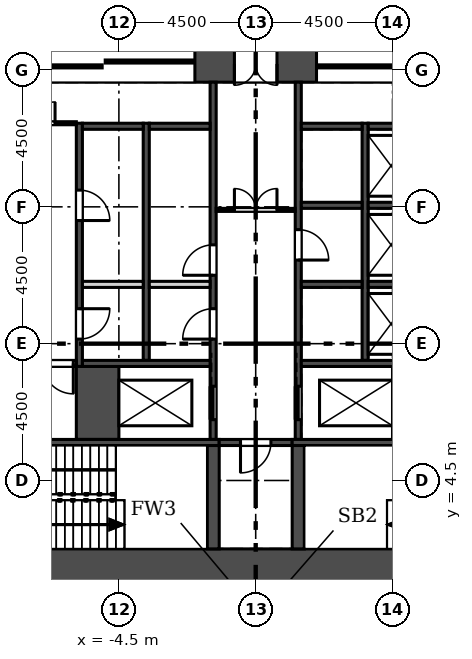
"""IFC4 building model, lengths in metres.
Left out: names, types, materials, properties, quantities, classifications, styles, units other than length and angle.
Written with IfcOpenShell. Run it as: python <this file> out.ifc"""

import sys

from ifc_helpers import new_model, si_unit, direction, frame, frame_2d, origin, place, context, subcontext, project, spatial, rectangle, extrude, element, fill, save


model = new_model("IFC4")
c1 = context("Model", 3, precision=1e-05, world=origin(), true_north=direction((0.0, 1.0)))
c2 = subcontext(c1, "Body", "Model", "MODEL_VIEW")
j1 = project(units=[si_unit("LENGTHUNIT", "METRE"), si_unit("PLANEANGLEUNIT", "RADIAN")], contexts=[c1])
p1 = place(None, origin())
s1 = spatial("IfcSite", under=j1, at=p1, CompositionType="ELEMENT")
p2 = place(p1, origin())
s2 = spatial("IfcBuilding", under=s1, at=p2, CompositionType="ELEMENT")
p3 = place(p2, frame((0.0, 0.0, 174.9)))
s3 = spatial("IfcBuildingStorey", under=s2, at=p3, CompositionType="ELEMENT", Elevation=174.9)
p4 = place(p3, frame((-13.8, 1.65, 0.0), z_axis=(0.0, 0.0, 1.0), x_axis=(1.0, 0.0, 0.0)))
e1 = element("IfcWall", 1, at=p4, inside=s3, PredefinedType="SHEAR", context=c2, shape_type="SweptSolid", body=[
    extrude(rectangle(XDim=27.6, YDim=1.2, at=frame_2d((13.8, 0.0))), origin(), (0.0, 0.0, 1.0), 7.2),
])
p5 = place(p3, frame((9.296, 18.2, 0.0), z_axis=(0.0, 0.0, 1.0), x_axis=(-1.0, 0.0, 0.0)))
e2 = element("IfcWall", 2, at=p5, inside=s3, PredefinedType="SHEAR", context=c2, shape_type="SweptSolid", body=[
    extrude(rectangle(XDim=18.592, YDim=1.2, at=frame_2d((9.296, 0.0))), origin(), (0.0, 0.0, 1.0), 7.2),
])
p6 = place(p5, frame((8.596, 0.0, 0.0)))
e3 = element("IfcOpeningElement", 3, at=p6, cuts=e2, PredefinedType="OPENING", context=c2, shape_type="SweptSolid", body=[
    extrude(rectangle(XDim=1.4, YDim=2.1, at=frame_2d((0.7, 1.05))), frame((0.0, 0.61, 0.0), z_axis=(0.0, -1.0, 0.0), x_axis=(1.0, 0.0, 0.0)), (0.0, 0.0, 1.0), 1.22),
])
p7 = place(p5, frame((11.296, 0.0, 0.0)))
e4 = element("IfcOpeningElement", 4, at=p7, cuts=e2, PredefinedType="OPENING", context=c2, shape_type="SweptSolid", body=[
    extrude(rectangle(XDim=6.0, YDim=2.4, at=frame_2d((3.0, 1.2))), frame((0.0, 0.61, 0.0), z_axis=(0.0, -1.0, 0.0), x_axis=(1.0, 0.0, 0.0)), (0.0, 0.0, 1.0), 1.22),
])
p8 = place(p5, frame((1.296, 0.0, 0.0)))
e5 = element("IfcOpeningElement", 5, at=p8, cuts=e2, PredefinedType="OPENING", context=c2, shape_type="SweptSolid", body=[
    extrude(rectangle(XDim=6.0, YDim=2.4, at=frame_2d((3.0, 1.2))), frame((0.0, 0.61, 0.0), z_axis=(0.0, -1.0, 0.0), x_axis=(1.0, 0.0, 0.0)), (0.0, 0.0, 1.0), 1.22),
])
p9 = place(p3, frame((28.257, 7.709, 0.0), z_axis=(0.0, 0.0, 1.0), x_axis=(-0.500002420408, 0.866024006357, 0.0)))
e6 = element("IfcWall", 6, at=p9, inside=s3, PredefinedType="SOLIDWALL", context=c2, shape_type="SweptSolid", body=[
    extrude(rectangle(XDim=47.807, YDim=0.34, at=frame_2d((23.904, 0.0))), origin(), (0.0, 0.0, 1.0), 6.8),
])
p10 = place(p9, frame((32.452, 0.0, 0.9)))
e7 = element("IfcOpeningElement", 7, at=p10, cuts=e6, PredefinedType="OPENING", context=c2, shape_type="SweptSolid", body=[
    extrude(rectangle(XDim=1.885, YDim=3.0, at=frame_2d((0.942, 1.5))), frame((0.0, 0.18, 0.0), z_axis=(0.0, -1.0, 0.0), x_axis=(1.0, 0.0, 0.0)), (0.0, 0.0, 1.0), 0.36),
])
p11 = place(p9, frame((38.452, 0.0, 0.9)))
e8 = element("IfcOpeningElement", 8, at=p11, cuts=e6, PredefinedType="OPENING", context=c2, shape_type="SweptSolid", body=[
    extrude(rectangle(XDim=1.885, YDim=3.0, at=frame_2d((0.942, 1.5))), frame((0.0, 0.18, 0.0), z_axis=(0.0, -1.0, 0.0), x_axis=(1.0, 0.0, 0.0)), (0.0, 0.0, 1.0), 0.36),
])
p12 = place(p9, frame((44.452, 0.0, 0.9)))
e9 = element("IfcOpeningElement", 9, at=p12, cuts=e6, PredefinedType="OPENING", context=c2, shape_type="SweptSolid", body=[
    extrude(rectangle(XDim=1.885, YDim=3.0, at=frame_2d((0.942, 1.5))), frame((0.0, 0.18, 0.0), z_axis=(0.0, -1.0, 0.0), x_axis=(1.0, 0.0, 0.0)), (0.0, 0.0, 1.0), 0.36),
])
p13 = place(p3, frame((-4.353, 49.112, 0.0), z_axis=(0.0, 0.0, 1.0), x_axis=(-0.500002420408, -0.866024006357, 0.0)))
e10 = element("IfcWall", 10, at=p13, inside=s3, PredefinedType="SOLIDWALL", context=c2, shape_type="SweptSolid", body=[
    extrude(rectangle(XDim=47.807, YDim=0.34, at=frame_2d((23.904, 0.0))), origin(), (0.0, 0.0, 1.0), 6.8),
])
p14 = place(p3, frame((-5.8, 8.25, -0.4), z_axis=(0.0, 0.0, 1.0), x_axis=(0.0, 1.0, 0.0)))
e11 = element("IfcWall", 11, at=p14, inside=s3, PredefinedType="SOLIDWALL", context=c2, shape_type="SweptSolid", body=[
    extrude(rectangle(XDim=8.0, YDim=0.2, at=frame_2d((4.0, 0.0))), origin(), (0.0, 0.0, 1.0), 7.2),
])
p15 = place(p14, frame((0.9, 0.0, 0.4)))
e12 = element("IfcOpeningElement", 12, at=p15, cuts=e11, PredefinedType="OPENING", context=c2, shape_type="SweptSolid", body=[
    extrude(rectangle(XDim=1.0, YDim=2.1, at=frame_2d((0.5, 1.05))), frame((0.0, 0.11, 0.0), z_axis=(0.0, -1.0, 0.0), x_axis=(1.0, 0.0, 0.0)), (0.0, 0.0, 1.0), 0.22),
])
p16 = place(p14, frame((4.8, 0.0, 0.4)))
e13 = element("IfcOpeningElement", 13, at=p16, cuts=e11, PredefinedType="OPENING", context=c2, shape_type="SweptSolid", body=[
    extrude(rectangle(XDim=1.0, YDim=2.1, at=frame_2d((0.5, 1.05))), frame((0.0, 0.11, 0.0), z_axis=(0.0, -1.0, 0.0), x_axis=(1.0, 0.0, 0.0)), (0.0, 0.0, 1.0), 0.22),
])
for number, where, z_axis, x_axis in (
    (14, (-3.6, 8.45, -0.4), (0.0, 0.0, 1.0), (0.0, 1.0, 0.0)),
    (15, (3.6, 8.45, -0.4), (0.0, 0.0, 1.0), (0.0, 1.0, 0.0)),
):
    element("IfcWall", number, at=place(p3, frame(where, z_axis=z_axis, x_axis=x_axis)), inside=s3, PredefinedType="SOLIDWALL", context=c2, shape_type="SweptSolid", body=[
        extrude(rectangle(XDim=7.8, YDim=0.2, at=frame_2d((3.9, 0.0))), origin(), (0.0, 0.0, 1.0), 7.2),
    ])
p17 = place(p3, frame((-1.4, 5.85, -0.4), z_axis=(0.0, 0.0, 1.0), x_axis=(0.0, 1.0, 0.0)))
e16 = element("IfcWall", 16, at=p17, inside=s3, PredefinedType="SOLIDWALL", context=c2, shape_type="SweptSolid", body=[
    extrude(rectangle(XDim=11.75, YDim=0.2, at=frame_2d((5.875, 0.0))), origin(), (0.0, 0.0, 1.0), 7.2),
])
p18 = place(p17, frame((0.65, 0.0, 0.4)))
e17 = element("IfcOpeningElement", 17, at=p18, cuts=e16, PredefinedType="OPENING", context=c2, shape_type="SweptSolid", body=[
    extrude(rectangle(XDim=1.1, YDim=2.1, at=frame_2d((0.55, 1.05))), frame((0.0, 0.11, 0.0), z_axis=(0.0, -1.0, 0.0), x_axis=(1.0, 0.0, 0.0)), (0.0, 0.0, 1.0), 0.22),
])
p19 = place(p17, frame((3.3, 0.0, 0.4)))
e18 = element("IfcOpeningElement", 18, at=p19, cuts=e16, PredefinedType="OPENING", context=c2, shape_type="SweptSolid", body=[
    extrude(rectangle(XDim=1.0, YDim=2.1, at=frame_2d((0.5, 1.05))), frame((0.0, 0.11, 0.0), z_axis=(0.0, -1.0, 0.0), x_axis=(1.0, 0.0, 0.0)), (0.0, 0.0, 1.0), 0.22),
])
p20 = place(p17, frame((5.4, 0.0, 0.4)))
e19 = element("IfcOpeningElement", 19, at=p20, cuts=e16, PredefinedType="OPENING", context=c2, shape_type="SweptSolid", body=[
    extrude(rectangle(XDim=1.0, YDim=2.1, at=frame_2d((0.5, 1.05))), frame((0.0, 0.11, 0.0), z_axis=(0.0, -1.0, 0.0), x_axis=(1.0, 0.0, 0.0)), (0.0, 0.0, 1.0), 0.22),
])
p21 = place(p3, frame((1.4, 5.85, -0.4), z_axis=(0.0, 0.0, 1.0), x_axis=(0.0, 1.0, 0.0)))
e20 = element("IfcWall", 20, at=p21, inside=s3, PredefinedType="SOLIDWALL", context=c2, shape_type="SweptSolid", body=[
    extrude(rectangle(XDim=11.75, YDim=0.2, at=frame_2d((5.875, 0.0))), origin(), (0.0, 0.0, 1.0), 7.2),
])
p22 = place(p21, frame((0.65, 0.0, 0.4)))
e21 = element("IfcOpeningElement", 21, at=p22, cuts=e20, PredefinedType="OPENING", context=c2, shape_type="SweptSolid", body=[
    extrude(rectangle(XDim=1.1, YDim=2.1, at=frame_2d((0.55, 1.05))), frame((0.0, 0.11, 0.0), z_axis=(0.0, -1.0, 0.0), x_axis=(1.0, 0.0, 0.0)), (0.0, 0.0, 1.0), 0.22),
])
p23 = place(p21, frame((5.9, 0.0, 0.4)))
e22 = element("IfcOpeningElement", 22, at=p23, cuts=e20, PredefinedType="OPENING", context=c2, shape_type="SweptSolid", body=[
    extrude(rectangle(XDim=1.0, YDim=2.1, at=frame_2d((0.5, 1.05))), frame((0.0, 0.11, 0.0), z_axis=(0.0, -1.0, 0.0), x_axis=(1.0, 0.0, 0.0)), (0.0, 0.0, 1.0), 0.22),
])
p24 = place(p3, frame((-5.2, 5.85, -0.4), z_axis=(0.0, 0.0, 1.0), x_axis=(0.0, 1.0, 0.0)))
e23 = element("IfcWall", 23, at=p24, inside=s3, PredefinedType="SOLIDWALL", context=c2, shape_type="SweptSolid", body=[
    extrude(rectangle(XDim=2.4, YDim=1.4, at=frame_2d((1.2, 0.0))), origin(), (0.0, 0.0, 1.0), 7.2),
])
for number, where, z_axis, x_axis in (
    (24, (-5.7, 8.35, -0.4), (0.0, 0.0, 1.0), (1.0, 0.0, 0.0)),
    (25, (1.5, 8.35, -0.4), (0.0, 0.0, 1.0), (1.0, 0.0, 0.0)),
):
    element("IfcWall", number, at=place(p3, frame(where, z_axis=z_axis, x_axis=x_axis)), inside=s3, PredefinedType="SOLIDWALL", context=c2, shape_type="SweptSolid", body=[
        extrude(rectangle(XDim=4.2, YDim=0.2, at=frame_2d((2.1, 0.0))), origin(), (0.0, 0.0, 1.0), 7.2),
    ])
p25 = place(p3, frame((-12.6, 5.75, -0.4), z_axis=(0.0, 0.0, 1.0), x_axis=(1.0, 0.0, 0.0)))
e26 = element("IfcWall", 26, at=p25, inside=s3, PredefinedType="SOLIDWALL", context=c2, shape_type="SweptSolid", body=[
    extrude(rectangle(XDim=11.4, YDim=0.2, at=frame_2d((5.7, 0.0))), origin(), (0.0, 0.0, 1.0), 7.2),
])
p26 = place(p3, frame((-1.2, 5.75, -0.4), z_axis=(0.0, 0.0, 1.0), x_axis=(1.0, 0.0, 0.0)))
e27 = element("IfcWall", 27, at=p26, inside=s3, PredefinedType="SOLIDWALL", context=c2, shape_type="SweptSolid", body=[
    extrude(rectangle(XDim=2.4, YDim=0.2, at=frame_2d((1.2, 0.0))), origin(), (0.0, 0.0, 1.0), 7.2),
])
p27 = place(p26, frame((0.7, 0.0, 0.4)))
e28 = element("IfcOpeningElement", 28, at=p27, cuts=e27, PredefinedType="OPENING", context=c2, shape_type="SweptSolid", body=[
    extrude(rectangle(XDim=1.0, YDim=2.1, at=frame_2d((0.5, 1.05))), frame((0.0, 0.11, 0.0), z_axis=(0.0, -1.0, 0.0), x_axis=(1.0, 0.0, 0.0)), (0.0, 0.0, 1.0), 0.22),
])
p28 = place(p3, frame((1.2, 5.75, -0.4), z_axis=(0.0, 0.0, 1.0), x_axis=(1.0, 0.0, 0.0)))
e29 = element("IfcWall", 29, at=p28, inside=s3, PredefinedType="SOLIDWALL", context=c2, shape_type="SweptSolid", body=[
    extrude(rectangle(XDim=11.4, YDim=0.2, at=frame_2d((5.7, 0.0))), origin(), (0.0, 0.0, 1.0), 7.2),
])
for number, where, z_axis, x_axis in (
    (30, (-1.4, 2.25, -0.4), (0.0, 0.0, 1.0), (0.0, 1.0, 0.0)),
    (31, (1.4, 2.25, -0.4), (0.0, 0.0, 1.0), (0.0, 1.0, 0.0)),
):
    element("IfcWall", number, at=place(p3, frame(where, z_axis=z_axis, x_axis=x_axis)), inside=s3, PredefinedType="SOLIDWALL", context=c2, shape_type="SweptSolid", body=[
        extrude(rectangle(XDim=3.4, YDim=0.4, at=frame_2d((1.7, 0.0))), origin(), (0.0, 0.0, 1.0), 7.2),
    ])
p29 = place(p3, frame((-5.7, 10.95, 0.0), z_axis=(0.0, 0.0, 1.0), x_axis=(1.0, 0.0, 0.0)))
e32 = element("IfcWall", 32, at=p29, inside=s3, PredefinedType="SOLIDWALL", context=c2, shape_type="SweptSolid", body=[
    extrude(rectangle(XDim=2.0, YDim=0.2, at=frame_2d((1.0, 0.0))), origin(), (0.0, 0.0, 1.0), 6.8),
])
p30 = place(p3, frame((-5.7, 16.15, -0.4), z_axis=(0.0, 0.0, 1.0), x_axis=(1.0, 0.0, 0.0)))
e33 = element("IfcWall", 33, at=p30, inside=s3, PredefinedType="SOLIDWALL", context=c2, shape_type="SweptSolid", body=[
    extrude(rectangle(XDim=2.0, YDim=0.2, at=frame_2d((1.0, 0.0))), origin(), (0.0, 0.0, 1.0), 7.2),
])
p31 = place(p3, frame((-3.5, 10.95, 0.0), z_axis=(0.0, 0.0, 1.0), x_axis=(1.0, 0.0, 0.0)))
e34 = element("IfcWall", 34, at=p31, inside=s3, PredefinedType="SOLIDWALL", context=c2, shape_type="SweptSolid", body=[
    extrude(rectangle(XDim=2.0, YDim=0.2, at=frame_2d((1.0, 0.0))), origin(), (0.0, 0.0, 1.0), 6.8),
])
for number, where, z_axis, x_axis in (
    (35, (-3.5, 16.15, -0.4), (0.0, 0.0, 1.0), (1.0, 0.0, 0.0)),
    (36, (3.7, 10.95, -0.4), (0.0, 0.0, 1.0), (1.0, 0.0, 0.0)),
    (37, (3.7, 13.55, -0.4), (0.0, 0.0, 1.0), (1.0, 0.0, 0.0)),
    (38, (3.7, 16.15, -0.4), (0.0, 0.0, 1.0), (1.0, 0.0, 0.0)),
    (39, (1.5, 10.95, -0.4), (0.0, 0.0, 1.0), (1.0, 0.0, 0.0)),
    (40, (1.5, 13.55, -0.4), (0.0, 0.0, 1.0), (1.0, 0.0, 0.0)),
    (41, (1.5, 16.15, -0.4), (0.0, 0.0, 1.0), (1.0, 0.0, 0.0)),
):
    element("IfcWall", number, at=place(p3, frame(where, z_axis=z_axis, x_axis=x_axis)), inside=s3, PredefinedType="SOLIDWALL", context=c2, shape_type="SweptSolid", body=[
        extrude(rectangle(XDim=2.0, YDim=0.2, at=frame_2d((1.0, 0.0))), origin(), (0.0, 0.0, 1.0), 7.2),
    ])
p32 = place(p3, frame((-8.7, 16.25, 0.0), z_axis=(0.0, 0.0, 1.0), x_axis=(1.0, 0.0, 0.0)))
e42 = element("IfcWall", 42, at=p32, inside=s3, PredefinedType="PARTITIONING", context=c2, shape_type="SweptSolid", body=[
    extrude(rectangle(XDim=2.8, YDim=0.1, at=frame_2d((1.4, 0.0))), origin(), (0.0, 0.0, 1.0), 6.8),
])
p33 = place(p32, frame((0.7, 0.0, 0.0)))
e43 = element("IfcOpeningElement", 43, at=p33, cuts=e42, PredefinedType="OPENING", context=c2, shape_type="SweptSolid", body=[
    extrude(rectangle(XDim=1.4, YDim=2.1, at=frame_2d((0.7, 1.05))), frame((0.0, 0.06, 0.0), z_axis=(0.0, -1.0, 0.0), x_axis=(1.0, 0.0, 0.0)), (0.0, 0.0, 1.0), 0.12),
])
p34 = place(p3, frame((-8.7, 8.35, 0.0), z_axis=(0.0, 0.0, 1.0), x_axis=(1.0, 0.0, 0.0)))
e44 = element("IfcWall", 44, at=p34, inside=s3, PredefinedType="SOLIDWALL", context=c2, shape_type="SweptSolid", body=[
    extrude(rectangle(XDim=2.8, YDim=0.2, at=frame_2d((1.4, 0.0))), origin(), (0.0, 0.0, 1.0), 6.8),
])
p35 = place(p34, frame((1.7, 0.0, 0.0)))
e45 = element("IfcOpeningElement", 45, at=p35, cuts=e44, PredefinedType="OPENING", context=c2, shape_type="SweptSolid", body=[
    extrude(rectangle(XDim=1.0, YDim=2.1, at=frame_2d((0.5, 1.05))), frame((0.0, 0.11, 0.0), z_axis=(0.0, -1.0, 0.0), x_axis=(1.0, 0.0, 0.0)), (0.0, 0.0, 1.0), 0.22),
])
p36 = place(p3, frame((-1.3, 13.4, 0.0), z_axis=(0.0, 0.0, 1.0), x_axis=(1.0, 0.0, 0.0)))
e46 = element("IfcWall", 46, at=p36, inside=s3, PredefinedType="PARTITIONING", context=c2, shape_type="SweptSolid", body=[
    extrude(rectangle(XDim=2.6, YDim=0.1, at=frame_2d((1.3, 0.0))), origin(), (0.0, 0.0, 1.0), 6.8),
])
p37 = place(p36, frame((0.6, 0.0, 0.0)))
e47 = element("IfcOpeningElement", 47, at=p37, cuts=e46, PredefinedType="OPENING", context=c2, shape_type="SweptSolid", body=[
    extrude(rectangle(XDim=1.4, YDim=2.1, at=frame_2d((0.7, 1.05))), frame((0.0, 0.06, 0.0), z_axis=(0.0, -1.0, 0.0), x_axis=(1.0, 0.0, 0.0)), (0.0, 0.0, 1.0), 0.12),
])
p38 = place(p18, origin())
e48 = element("IfcDoor", 48, at=p38, inside=s3, OperationType="SLIDING_TO_RIGHT", PredefinedType="DOOR", context=c2, shape_type="SweptSolid", body=[
    extrude(rectangle(XDim=1.1, YDim=2.1, at=frame_2d((0.55, 1.05))), frame((0.0, 0.025, 0.0), z_axis=(0.0, -1.0, 0.0), x_axis=(1.0, 0.0, 0.0)), (0.0, 0.0, 1.0), 0.05),
])
fill(e17, e48)
p39 = place(p22, origin())
e49 = element("IfcDoor", 49, at=p39, inside=s3, OperationType="SLIDING_TO_RIGHT", PredefinedType="DOOR", context=c2, shape_type="SweptSolid", body=[
    extrude(rectangle(XDim=1.1, YDim=2.1, at=frame_2d((0.55, 1.05))), frame((0.0, 0.025, 0.0), z_axis=(0.0, -1.0, 0.0), x_axis=(1.0, 0.0, 0.0)), (0.0, 0.0, 1.0), 0.05),
])
fill(e21, e49)
p40 = place(p15, frame((1.0, 0.0, 0.0), z_axis=(0.0, 0.0, 1.0), x_axis=(-1.0, 0.0, 0.0)))
e50 = element("IfcDoor", 50, at=p40, inside=s3, OperationType="SINGLE_SWING_LEFT", PredefinedType="DOOR", context=c2, shape_type="SweptSolid", body=[
    extrude(rectangle(XDim=1.0, YDim=2.1, at=frame_2d((0.5, 1.05))), frame((0.0, 0.025, 0.0), z_axis=(0.0, -1.0, 0.0), x_axis=(1.0, 0.0, 0.0)), (0.0, 0.0, 1.0), 0.05),
])
fill(e12, e50)
p41 = place(p16, frame((1.0, 0.0, 0.0), z_axis=(0.0, 0.0, 1.0), x_axis=(-1.0, 0.0, 0.0)))
e51 = element("IfcDoor", 51, at=p41, inside=s3, OperationType="SINGLE_SWING_RIGHT", PredefinedType="DOOR", context=c2, shape_type="SweptSolid", body=[
    extrude(rectangle(XDim=1.0, YDim=2.1, at=frame_2d((0.5, 1.05))), frame((0.0, 0.025, 0.0), z_axis=(0.0, -1.0, 0.0), x_axis=(1.0, 0.0, 0.0)), (0.0, 0.0, 1.0), 0.05),
])
fill(e13, e51)
p42 = place(p19, origin())
e52 = element("IfcDoor", 52, at=p42, inside=s3, OperationType="SINGLE_SWING_LEFT", PredefinedType="DOOR", context=c2, shape_type="SweptSolid", body=[
    extrude(rectangle(XDim=1.0, YDim=2.1, at=frame_2d((0.5, 1.05))), frame((0.0, 0.025, 0.0), z_axis=(0.0, -1.0, 0.0), x_axis=(1.0, 0.0, 0.0)), (0.0, 0.0, 1.0), 0.05),
])
fill(e18, e52)
p43 = place(p20, origin())
e53 = element("IfcDoor", 53, at=p43, inside=s3, OperationType="SINGLE_SWING_LEFT", PredefinedType="DOOR", context=c2, shape_type="SweptSolid", body=[
    extrude(rectangle(XDim=1.0, YDim=2.1, at=frame_2d((0.5, 1.05))), frame((0.0, 0.025, 0.0), z_axis=(0.0, -1.0, 0.0), x_axis=(1.0, 0.0, 0.0)), (0.0, 0.0, 1.0), 0.05),
])
fill(e19, e53)
p44 = place(p23, frame((1.0, 0.0, 0.0), z_axis=(0.0, 0.0, 1.0), x_axis=(-1.0, 0.0, 0.0)))
e54 = element("IfcDoor", 54, at=p44, inside=s3, OperationType="SINGLE_SWING_RIGHT", PredefinedType="DOOR", context=c2, shape_type="SweptSolid", body=[
    extrude(rectangle(XDim=1.0, YDim=2.1, at=frame_2d((0.5, 1.05))), frame((0.0, 0.025, 0.0), z_axis=(0.0, -1.0, 0.0), x_axis=(1.0, 0.0, 0.0)), (0.0, 0.0, 1.0), 0.05),
])
fill(e22, e54)
p45 = place(p27, frame((1.0, 0.0, 0.0), z_axis=(0.0, 0.0, 1.0), x_axis=(-1.0, 0.0, 0.0)))
e55 = element("IfcDoor", 55, at=p45, inside=s3, OperationType="SINGLE_SWING_RIGHT", PredefinedType="DOOR", context=c2, shape_type="SweptSolid", body=[
    extrude(rectangle(XDim=1.0, YDim=2.1, at=frame_2d((0.5, 1.05))), frame((0.0, 0.025, 0.0), z_axis=(0.0, -1.0, 0.0), x_axis=(1.0, 0.0, 0.0)), (0.0, 0.0, 1.0), 0.05),
])
fill(e28, e55)
p46 = place(p33, origin())
e56 = element("IfcDoor", 56, at=p46, inside=s3, OperationType="DOUBLE_DOOR_SINGLE_SWING", PredefinedType="DOOR", context=c2, shape_type="SweptSolid", body=[
    extrude(rectangle(XDim=1.4, YDim=2.1, at=frame_2d((0.7, 1.05))), frame((0.0, 0.025, 0.0), z_axis=(0.0, -1.0, 0.0), x_axis=(1.0, 0.0, 0.0)), (0.0, 0.0, 1.0), 0.05),
])
fill(e43, e56)
p47 = place(p35, frame((1.0, 0.0, 0.0), z_axis=(0.0, 0.0, 1.0), x_axis=(-1.0, 0.0, 0.0)))
e57 = element("IfcDoor", 57, at=p47, inside=s3, OperationType="SINGLE_SWING_LEFT", PredefinedType="DOOR", context=c2, shape_type="SweptSolid", body=[
    extrude(rectangle(XDim=1.0, YDim=2.1, at=frame_2d((0.5, 1.05))), frame((0.0, 0.025, 0.0), z_axis=(0.0, -1.0, 0.0), x_axis=(1.0, 0.0, 0.0)), (0.0, 0.0, 1.0), 0.05),
])
fill(e45, e57)
p48 = place(p37, origin())
e58 = element("IfcDoor", 58, at=p48, inside=s3, OperationType="DOUBLE_DOOR_SINGLE_SWING", PredefinedType="DOOR", context=c2, shape_type="SweptSolid", body=[
    extrude(rectangle(XDim=1.4, YDim=2.1, at=frame_2d((0.7, 1.05))), frame((0.0, 0.025, 0.0), z_axis=(0.0, -1.0, 0.0), x_axis=(1.0, 0.0, 0.0)), (0.0, 0.0, 1.0), 0.05),
])
fill(e47, e58)
p49 = place(p6, origin())
e59 = element("IfcDoor", 59, at=p49, inside=s3, OperationType="DOUBLE_DOOR_SINGLE_SWING", PredefinedType="DOOR", context=c2, shape_type="SweptSolid", body=[
    extrude(rectangle(XDim=1.4, YDim=2.1, at=frame_2d((0.7, 1.05))), frame((0.0, 0.025, 0.0), z_axis=(0.0, -1.0, 0.0), x_axis=(1.0, 0.0, 0.0)), (0.0, 0.0, 1.0), 0.05),
])
fill(e3, e59)
p50 = place(p7, origin())
e60 = element("IfcDoor", 60, at=p50, inside=s3, OperationType="DOUBLE_DOOR_SLIDING", PredefinedType="DOOR", context=c2, shape_type="SweptSolid", body=[
    extrude(rectangle(XDim=6.0, YDim=2.4, at=frame_2d((3.0, 1.2))), frame((0.0, 0.025, 0.0), z_axis=(0.0, -1.0, 0.0), x_axis=(1.0, 0.0, 0.0)), (0.0, 0.0, 1.0), 0.05),
])
fill(e4, e60)
p51 = place(p8, origin())
e61 = element("IfcDoor", 61, at=p51, inside=s3, OperationType="DOUBLE_DOOR_SLIDING", PredefinedType="DOOR", context=c2, shape_type="SweptSolid", body=[
    extrude(rectangle(XDim=6.0, YDim=2.4, at=frame_2d((3.0, 1.2))), frame((0.0, 0.025, 0.0), z_axis=(0.0, -1.0, 0.0), x_axis=(1.0, 0.0, 0.0)), (0.0, 0.0, 1.0), 0.05),
])
fill(e5, e61)
save(model, sys.argv[1])
